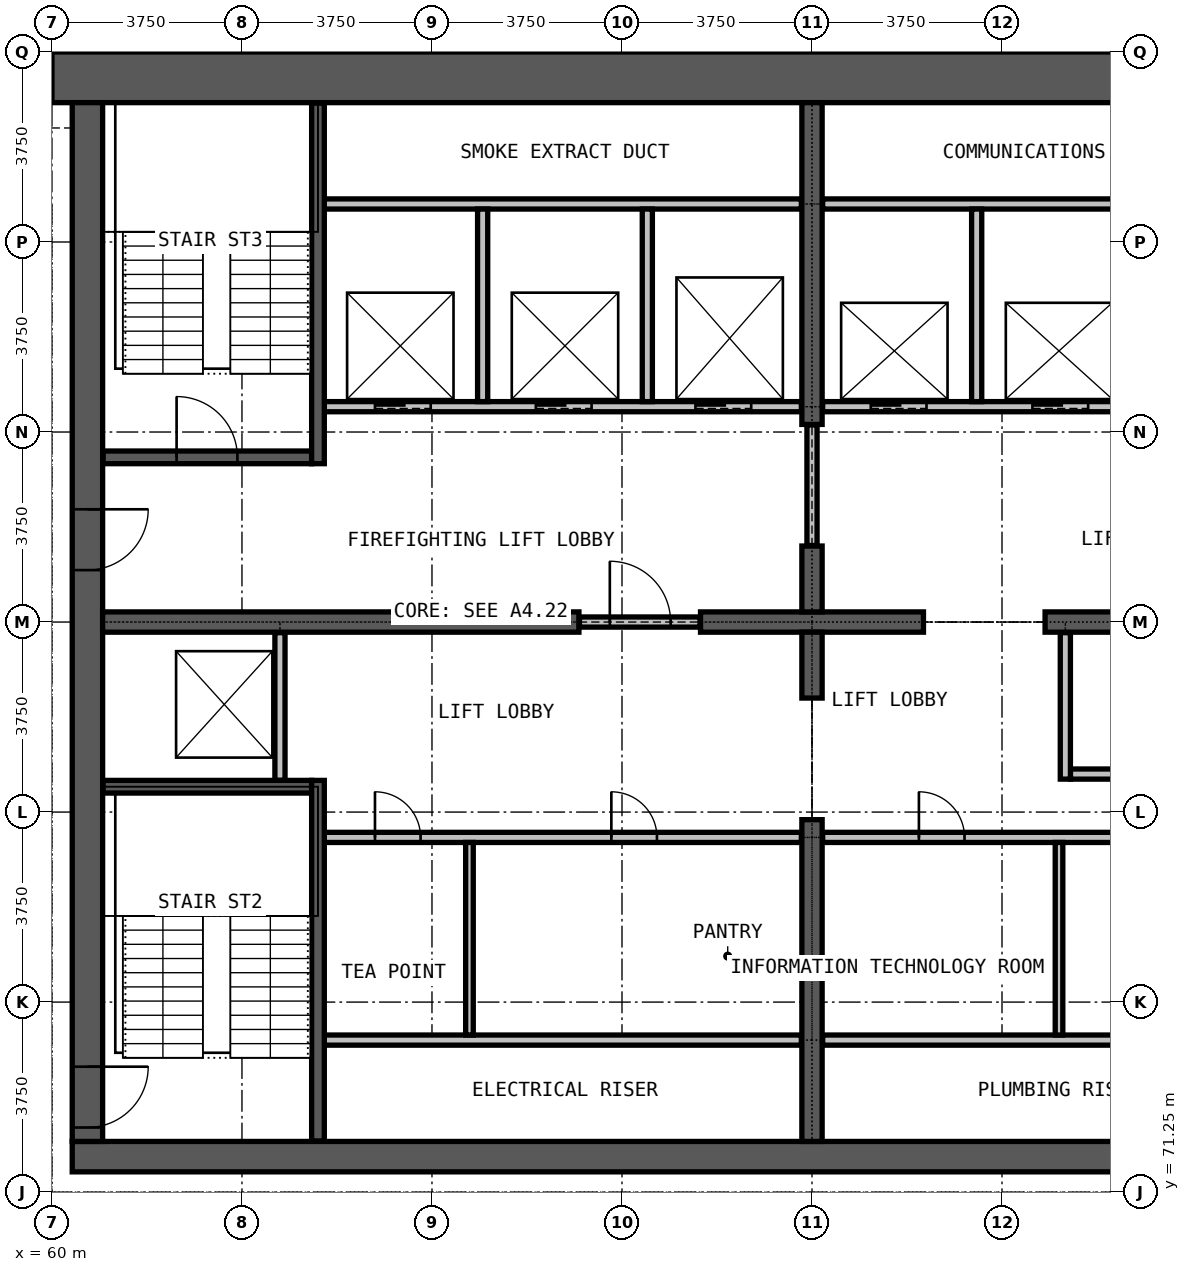
"""IFC4 building model, lengths in metres.
Left out: names, types, materials, properties, quantities, classifications, styles, units other than length and angle.
Written with IfcOpenShell. Run it as: python <this file> out.ifc"""

import sys

from ifc_helpers import new_model, si_unit, direction, frame, frame_2d, origin, place, context, subcontext, project, spatial, rectangle, extrude, element, fill, save


model = new_model("IFC4")
c1 = context("Model", 3, precision=1e-05, world=origin(), true_north=direction((0.0, 1.0)))
c2 = subcontext(c1, "Body", "Model", "MODEL_VIEW")
j1 = project(units=[si_unit("LENGTHUNIT", "METRE"), si_unit("PLANEANGLEUNIT", "RADIAN")], contexts=[c1])
p1 = place(None, origin())
s1 = spatial("IfcSite", under=j1, at=p1, CompositionType="ELEMENT")
p2 = place(p1, origin())
s2 = spatial("IfcBuilding", under=s1, at=p2, CompositionType="ELEMENT")
p3 = place(p2, frame((0.0, 0.0, 235.5)))
s3 = spatial("IfcBuildingStorey", under=s2, at=p3, CompositionType="ELEMENT", Elevation=235.5)
p4 = place(p3, frame((60.4, 71.95, 0.0), z_axis=(0.0, 0.0, 1.0), x_axis=(1.0, 0.0, 0.0)))
e1 = element("IfcWall", 1, at=p4, inside=s3, PredefinedType="SHEAR", context=c2, shape_type="SweptSolid", body=[
    extrude(rectangle(XDim=29.2, YDim=0.6, at=frame_2d((14.6, 0.0))), origin(), (0.0, 0.0, 1.0), 3.6),
])
p5 = place(p3, frame((90.0, 93.25, 0.0), z_axis=(0.0, 0.0, 1.0), x_axis=(-1.0, 0.0, 0.0)))
e2 = element("IfcWall", 2, at=p5, inside=s3, PredefinedType="SHEAR", context=c2, shape_type="SweptSolid", body=[
    extrude(rectangle(XDim=30.0, YDim=1.0, at=frame_2d((15.0, 0.0))), origin(), (0.0, 0.0, 1.0), 3.6),
])
p6 = place(p3, frame((60.7, 92.75, 0.0), z_axis=(0.0, 0.0, 1.0), x_axis=(0.0, -1.0, 0.0)))
e3 = element("IfcWall", 3, at=p6, inside=s3, PredefinedType="SHEAR", context=c2, shape_type="SweptSolid", body=[
    extrude(rectangle(XDim=20.5, YDim=0.6, at=frame_2d((10.25, 0.0))), origin(), (0.0, 0.0, 1.0), 3.6),
])
p7 = place(p6, frame((19.025, 0.0, 0.0)))
e4 = element("IfcOpeningElement", 4, at=p7, cuts=e3, PredefinedType="OPENING", context=c2, shape_type="SweptSolid", body=[
    extrude(rectangle(XDim=1.2, YDim=2.2, at=frame_2d((0.6, 1.1))), frame((0.0, 0.31, 0.0), z_axis=(0.0, -1.0, 0.0), x_axis=(1.0, 0.0, 0.0)), (0.0, 0.0, 1.0), 0.62),
])
p8 = place(p6, frame((8.025, 0.0, 0.0)))
e5 = element("IfcOpeningElement", 5, at=p8, cuts=e3, PredefinedType="OPENING", context=c2, shape_type="SweptSolid", body=[
    extrude(rectangle(XDim=1.2, YDim=2.2, at=frame_2d((0.6, 1.1))), frame((0.0, 0.31, 0.0), z_axis=(0.0, -1.0, 0.0), x_axis=(1.0, 0.0, 0.0)), (0.0, 0.0, 1.0), 0.62),
])
p9 = place(p3, frame((61.0, 82.5, 0.0), z_axis=(0.0, 0.0, 1.0), x_axis=(1.0, 0.0, 0.0)))
e6 = element("IfcWall", 6, at=p9, inside=s3, PredefinedType="SHEAR", context=c2, shape_type="SweptSolid", body=[
    extrude(rectangle(XDim=9.4, YDim=0.4, at=frame_2d((4.7, 0.0))), origin(), (0.0, 0.0, 1.0), 3.6),
])
p10 = place(p3, frame((72.8, 82.5, 0.0), z_axis=(0.0, 0.0, 1.0), x_axis=(1.0, 0.0, 0.0)))
e7 = element("IfcWall", 7, at=p10, inside=s3, PredefinedType="SHEAR", context=c2, shape_type="SweptSolid", body=[
    extrude(rectangle(XDim=4.4, YDim=0.4, at=frame_2d((2.2, 0.0))), origin(), (0.0, 0.0, 1.0), 3.6),
])
p11 = place(p3, frame((79.6, 82.5, 0.0), z_axis=(0.0, 0.0, 1.0), x_axis=(1.0, 0.0, 0.0)))
e8 = element("IfcWall", 8, at=p11, inside=s3, PredefinedType="SHEAR", context=c2, shape_type="SweptSolid", body=[
    extrude(rectangle(XDim=9.4, YDim=0.4, at=frame_2d((4.7, 0.0))), origin(), (0.0, 0.0, 1.0), 3.6),
])
p12 = place(p3, frame((75.0, 72.25, 0.0), z_axis=(0.0, 0.0, 1.0), x_axis=(0.0, 1.0, 0.0)))
e9 = element("IfcWall", 9, at=p12, inside=s3, PredefinedType="SHEAR", context=c2, shape_type="SweptSolid", body=[
    extrude(rectangle(XDim=6.35, YDim=0.4, at=frame_2d((3.175, 0.0))), origin(), (0.0, 0.0, 1.0), 3.6),
])
for number, where, z_axis, x_axis in (
    (10, (75.0, 81.0, 0.0), (0.0, 0.0, 1.0), (0.0, 1.0, 0.0)),
    (11, (75.0, 82.7, 0.0), (0.0, 0.0, 1.0), (0.0, 1.0, 0.0)),
):
    element("IfcWall", number, at=place(p3, frame(where, z_axis=z_axis, x_axis=x_axis)), inside=s3, PredefinedType="SHEAR", context=c2, shape_type="SweptSolid", body=[
        extrude(rectangle(XDim=1.3, YDim=0.4, at=frame_2d((0.65, 0.0))), origin(), (0.0, 0.0, 1.0), 3.6),
    ])
p13 = place(p3, frame((75.0, 86.4, 0.0), z_axis=(0.0, 0.0, 1.0), x_axis=(0.0, 1.0, 0.0)))
e12 = element("IfcWall", 12, at=p13, inside=s3, PredefinedType="SHEAR", context=c2, shape_type="SweptSolid", body=[
    extrude(rectangle(XDim=6.35, YDim=0.4, at=frame_2d((3.175, 0.0))), origin(), (0.0, 0.0, 1.0), 3.6),
])
for number, where, z_axis, x_axis in (
    (13, (65.375, 74.25, 0.0), (0.0, 0.0, 1.0), (1.0, 0.0, 0.0)),
    (14, (75.21, 74.25, 0.0), (0.0, 0.0, 1.0), (1.0, 0.0, 0.0)),
):
    element("IfcWall", number, at=place(p3, frame(where, z_axis=z_axis, x_axis=x_axis)), inside=s3, PredefinedType="PARTITIONING", context=c2, shape_type="SweptSolid", body=[
        extrude(rectangle(XDim=9.415, YDim=0.2, at=frame_2d((4.708, 0.0))), origin(), (0.0, 0.0, 1.0), 3.3),
    ])
p14 = place(p3, frame((65.375, 78.25, 0.0), z_axis=(0.0, 0.0, 1.0), x_axis=(1.0, 0.0, 0.0)))
e15 = element("IfcWall", 15, at=p14, inside=s3, PredefinedType="PARTITIONING", context=c2, shape_type="SweptSolid", body=[
    extrude(rectangle(XDim=9.415, YDim=0.2, at=frame_2d((4.708, 0.0))), origin(), (0.0, 0.0, 1.0), 3.3),
])
p15 = place(p14, frame((1.0, 0.0, 0.0)))
e16 = element("IfcOpeningElement", 16, at=p15, cuts=e15, PredefinedType="OPENING", context=c2, shape_type="SweptSolid", body=[
    extrude(rectangle(XDim=0.9, YDim=2.2, at=frame_2d((0.45, 1.1))), frame((0.0, 0.11, 0.0), z_axis=(0.0, -1.0, 0.0), x_axis=(1.0, 0.0, 0.0)), (0.0, 0.0, 1.0), 0.22),
])
p16 = place(p14, frame((5.665, 0.0, 0.0)))
e17 = element("IfcOpeningElement", 17, at=p16, cuts=e15, PredefinedType="OPENING", context=c2, shape_type="SweptSolid", body=[
    extrude(rectangle(XDim=0.9, YDim=2.2, at=frame_2d((0.45, 1.1))), frame((0.0, 0.11, 0.0), z_axis=(0.0, -1.0, 0.0), x_axis=(1.0, 0.0, 0.0)), (0.0, 0.0, 1.0), 0.22),
])
p17 = place(p3, frame((75.21, 78.25, 0.0), z_axis=(0.0, 0.0, 1.0), x_axis=(1.0, 0.0, 0.0)))
e18 = element("IfcWall", 18, at=p17, inside=s3, PredefinedType="PARTITIONING", context=c2, shape_type="SweptSolid", body=[
    extrude(rectangle(XDim=9.415, YDim=0.2, at=frame_2d((4.708, 0.0))), origin(), (0.0, 0.0, 1.0), 3.3),
])
p18 = place(p17, frame((1.9, 0.0, 0.0)))
e19 = element("IfcOpeningElement", 19, at=p18, cuts=e18, PredefinedType="OPENING", context=c2, shape_type="SweptSolid", body=[
    extrude(rectangle(XDim=0.9, YDim=2.2, at=frame_2d((0.45, 1.1))), frame((0.0, 0.11, 0.0), z_axis=(0.0, -1.0, 0.0), x_axis=(1.0, 0.0, 0.0)), (0.0, 0.0, 1.0), 0.22),
])
p19 = place(p17, frame((6.565, 0.0, 0.0)))
e20 = element("IfcOpeningElement", 20, at=p19, cuts=e18, PredefinedType="OPENING", context=c2, shape_type="SweptSolid", body=[
    extrude(rectangle(XDim=0.9, YDim=2.2, at=frame_2d((0.45, 1.1))), frame((0.0, 0.11, 0.0), z_axis=(0.0, -1.0, 0.0), x_axis=(1.0, 0.0, 0.0)), (0.0, 0.0, 1.0), 0.22),
])
p20 = place(p3, frame((80.1, 79.5, 0.0), z_axis=(0.0, 0.0, 1.0), x_axis=(1.0, 0.0, 0.0)))
e21 = element("IfcWall", 21, at=p20, inside=s3, PredefinedType="PARTITIONING", context=c2, shape_type="SweptSolid", body=[
    extrude(rectangle(XDim=5.3, YDim=0.2, at=frame_2d((2.65, 0.0))), origin(), (0.0, 0.0, 1.0), 3.3),
])
p21 = place(p20, frame((2.2, 0.0, 0.0)))
e22 = element("IfcOpeningElement", 22, at=p21, cuts=e21, PredefinedType="OPENING", context=c2, shape_type="SweptSolid", body=[
    extrude(rectangle(XDim=0.9, YDim=2.2, at=frame_2d((0.45, 1.1))), frame((0.0, 0.11, 0.0), z_axis=(0.0, -1.0, 0.0), x_axis=(1.0, 0.0, 0.0)), (0.0, 0.0, 1.0), 0.22),
])
p22 = place(p3, frame((70.41, 82.5, 0.0), z_axis=(0.0, 0.0, 1.0), x_axis=(1.0, 0.0, 0.0)))
e23 = element("IfcWall", 23, at=p22, inside=s3, PredefinedType="PARTITIONING", context=c2, shape_type="SweptSolid", body=[
    extrude(rectangle(XDim=2.38, YDim=0.2, at=frame_2d((1.19, 0.0))), origin(), (0.0, 0.0, 1.0), 2.4),
])
p23 = place(p22, frame((0.6, 0.0, 0.0)))
e24 = element("IfcOpeningElement", 24, at=p23, cuts=e23, PredefinedType="OPENING", context=c2, shape_type="SweptSolid", body=[
    extrude(rectangle(XDim=1.2, YDim=2.2, at=frame_2d((0.6, 1.1))), frame((0.0, 0.11, 0.0), z_axis=(0.0, -1.0, 0.0), x_axis=(1.0, 0.0, 0.0)), (0.0, 0.0, 1.0), 0.22),
])
p24 = place(p3, frame((75.0, 84.01, 0.0), z_axis=(0.0, 0.0, 1.0), x_axis=(0.0, 1.0, 0.0)))
e25 = element("IfcWall", 25, at=p24, inside=s3, PredefinedType="PARTITIONING", context=c2, shape_type="SweptSolid", body=[
    extrude(rectangle(XDim=2.38, YDim=0.2, at=frame_2d((1.19, 0.0))), origin(), (0.0, 0.0, 1.0), 2.4),
])
p25 = place(p3, frame((80.0, 79.4, 0.0), z_axis=(0.0, 0.0, 1.0), x_axis=(0.0, 1.0, 0.0)))
e26 = element("IfcWall", 26, at=p25, inside=s3, PredefinedType="PARTITIONING", context=c2, shape_type="SweptSolid", body=[
    extrude(rectangle(XDim=2.89, YDim=0.2, at=frame_2d((1.445, 0.0))), origin(), (0.0, 0.0, 1.0), 3.3),
])
for number, where, z_axis, x_axis in (
    (27, (68.24, 74.35, 0.0), (0.0, 0.0, 1.0), (0.0, 1.0, 0.0)),
    (28, (79.875, 74.35, 0.0), (0.0, 0.0, 1.0), (0.0, 1.0, 0.0)),
):
    element("IfcWall", number, at=place(p3, frame(where, z_axis=z_axis, x_axis=x_axis)), inside=s3, PredefinedType="PARTITIONING", context=c2, shape_type="SweptSolid", body=[
        extrude(rectangle(XDim=3.8, YDim=0.15, at=frame_2d((1.9, 0.0))), origin(), (0.0, 0.0, 1.0), 3.3),
    ])
p26 = place(p3, frame((65.375, 86.75, 0.0), z_axis=(0.0, 0.0, 1.0), x_axis=(1.0, 0.0, 0.0)))
e29 = element("IfcWall", 29, at=p26, inside=s3, PredefinedType="PARTITIONING", context=c2, shape_type="SweptSolid", body=[
    extrude(rectangle(XDim=9.415, YDim=0.2, at=frame_2d((4.708, 0.0))), origin(), (0.0, 0.0, 1.0), 3.3),
])
p27 = place(p26, frame((1.0, 0.0, 0.0)))
e30 = element("IfcOpeningElement", 30, at=p27, cuts=e29, PredefinedType="OPENING", context=c2, shape_type="SweptSolid", body=[
    extrude(rectangle(XDim=1.1, YDim=2.2, at=frame_2d((0.55, 1.1))), frame((0.0, 0.11, 0.0), z_axis=(0.0, -1.0, 0.0), x_axis=(1.0, 0.0, 0.0)), (0.0, 0.0, 1.0), 0.22),
])
p28 = place(p26, frame((4.175, 0.0, 0.0)))
e31 = element("IfcOpeningElement", 31, at=p28, cuts=e29, PredefinedType="OPENING", context=c2, shape_type="SweptSolid", body=[
    extrude(rectangle(XDim=1.1, YDim=2.2, at=frame_2d((0.55, 1.1))), frame((0.0, 0.11, 0.0), z_axis=(0.0, -1.0, 0.0), x_axis=(1.0, 0.0, 0.0)), (0.0, 0.0, 1.0), 0.22),
])
p29 = place(p26, frame((7.325, 0.0, 0.0)))
e32 = element("IfcOpeningElement", 32, at=p29, cuts=e29, PredefinedType="OPENING", context=c2, shape_type="SweptSolid", body=[
    extrude(rectangle(XDim=1.1, YDim=2.2, at=frame_2d((0.55, 1.1))), frame((0.0, 0.11, 0.0), z_axis=(0.0, -1.0, 0.0), x_axis=(1.0, 0.0, 0.0)), (0.0, 0.0, 1.0), 0.22),
])
p30 = place(p3, frame((75.21, 86.75, 0.0), z_axis=(0.0, 0.0, 1.0), x_axis=(1.0, 0.0, 0.0)))
e33 = element("IfcWall", 33, at=p30, inside=s3, PredefinedType="PARTITIONING", context=c2, shape_type="SweptSolid", body=[
    extrude(rectangle(XDim=9.415, YDim=0.2, at=frame_2d((4.708, 0.0))), origin(), (0.0, 0.0, 1.0), 3.3),
])
p31 = place(p30, frame((0.95, 0.0, 0.0)))
e34 = element("IfcOpeningElement", 34, at=p31, cuts=e33, PredefinedType="OPENING", context=c2, shape_type="SweptSolid", body=[
    extrude(rectangle(XDim=1.1, YDim=2.2, at=frame_2d((0.55, 1.1))), frame((0.0, 0.11, 0.0), z_axis=(0.0, -1.0, 0.0), x_axis=(1.0, 0.0, 0.0)), (0.0, 0.0, 1.0), 0.22),
])
p32 = place(p30, frame((4.14, 0.0, 0.0)))
e35 = element("IfcOpeningElement", 35, at=p32, cuts=e33, PredefinedType="OPENING", context=c2, shape_type="SweptSolid", body=[
    extrude(rectangle(XDim=1.1, YDim=2.2, at=frame_2d((0.55, 1.1))), frame((0.0, 0.11, 0.0), z_axis=(0.0, -1.0, 0.0), x_axis=(1.0, 0.0, 0.0)), (0.0, 0.0, 1.0), 0.22),
])
p33 = place(p30, frame((7.29, 0.0, 0.0)))
e36 = element("IfcOpeningElement", 36, at=p33, cuts=e33, PredefinedType="OPENING", context=c2, shape_type="SweptSolid", body=[
    extrude(rectangle(XDim=1.1, YDim=2.2, at=frame_2d((0.55, 1.1))), frame((0.0, 0.11, 0.0), z_axis=(0.0, -1.0, 0.0), x_axis=(1.0, 0.0, 0.0)), (0.0, 0.0, 1.0), 0.22),
])
for number, where, z_axis, x_axis in (
    (37, (65.375, 90.75, 0.0), (0.0, 0.0, 1.0), (1.0, 0.0, 0.0)),
    (38, (75.21, 90.75, 0.0), (0.0, 0.0, 1.0), (1.0, 0.0, 0.0)),
):
    element("IfcWall", number, at=place(p3, frame(where, z_axis=z_axis, x_axis=x_axis)), inside=s3, PredefinedType="PARTITIONING", context=c2, shape_type="SweptSolid", body=[
        extrude(rectangle(XDim=9.415, YDim=0.2, at=frame_2d((4.708, 0.0))), origin(), (0.0, 0.0, 1.0), 3.3),
    ])
p34 = place(p3, frame((64.5, 79.375, 0.0), z_axis=(0.0, 0.0, 1.0), x_axis=(0.0, 1.0, 0.0)))
e39 = element("IfcWall", 39, at=p34, inside=s3, PredefinedType="PARTITIONING", context=c2, shape_type="SweptSolid", body=[
    extrude(rectangle(XDim=2.915, YDim=0.2, at=frame_2d((1.458, 0.0))), origin(), (0.0, 0.0, 1.0), 3.3),
])
for number, where, z_axis, x_axis in (
    (40, (68.5, 86.85, 0.0), (0.0, 0.0, 1.0), (0.0, 1.0, 0.0)),
    (41, (71.75, 86.85, 0.0), (0.0, 0.0, 1.0), (0.0, 1.0, 0.0)),
    (42, (78.25, 86.85, 0.0), (0.0, 0.0, 1.0), (0.0, 1.0, 0.0)),
):
    element("IfcWall", number, at=place(p3, frame(where, z_axis=z_axis, x_axis=x_axis)), inside=s3, PredefinedType="PARTITIONING", context=c2, shape_type="SweptSolid", body=[
        extrude(rectangle(XDim=3.8, YDim=0.2, at=frame_2d((1.9, 0.0))), origin(), (0.0, 0.0, 1.0), 3.3),
    ])
p35 = place(p3, frame((61.01, 79.25, 0.0), z_axis=(0.0, 0.0, 1.0), x_axis=(1.0, 0.0, 0.0)))
e43 = element("IfcWall", 43, at=p35, inside=s3, PredefinedType="PARTITIONING", context=c2, shape_type="SweptSolid", body=[
    extrude(rectangle(XDim=4.115, YDim=0.25, at=frame_2d((2.058, 0.0))), origin(), (0.0, 0.0, 1.0), 3.3),
])
p36 = place(p3, frame((61.01, 85.75, 0.0), z_axis=(0.0, 0.0, 1.0), x_axis=(1.0, 0.0, 0.0)))
e44 = element("IfcWall", 44, at=p36, inside=s3, PredefinedType="PARTITIONING", context=c2, shape_type="SweptSolid", body=[
    extrude(rectangle(XDim=4.115, YDim=0.25, at=frame_2d((2.058, 0.0))), origin(), (0.0, 0.0, 1.0), 3.3),
])
p37 = place(p36, frame((1.45, 0.0, 0.0)))
e45 = element("IfcOpeningElement", 45, at=p37, cuts=e44, PredefinedType="OPENING", context=c2, shape_type="SweptSolid", body=[
    extrude(rectangle(XDim=1.2, YDim=2.2, at=frame_2d((0.6, 1.1))), frame((0.0, 0.135, 0.0), z_axis=(0.0, -1.0, 0.0), x_axis=(1.0, 0.0, 0.0)), (0.0, 0.0, 1.0), 0.27),
])
for number, where, z_axis, x_axis in (
    (46, (65.25, 72.26, 0.0), (0.0, 0.0, 1.0), (0.0, 1.0, 0.0)),
    (47, (65.25, 85.625, 0.0), (0.0, 0.0, 1.0), (0.0, 1.0, 0.0)),
):
    element("IfcWall", number, at=place(p3, frame(where, z_axis=z_axis, x_axis=x_axis)), inside=s3, PredefinedType="PARTITIONING", context=c2, shape_type="SweptSolid", body=[
        extrude(rectangle(XDim=7.115, YDim=0.25, at=frame_2d((3.558, 0.0))), origin(), (0.0, 0.0, 1.0), 3.3),
    ])
p38 = place(p31, origin())
e48 = element("IfcDoor", 48, at=p38, inside=s3, OperationType="DOUBLE_DOOR_SLIDING", PredefinedType="DOOR", context=c2, shape_type="SweptSolid", body=[
    extrude(rectangle(XDim=1.1, YDim=2.2, at=frame_2d((0.55, 1.1))), frame((0.0, 0.025, 0.0), z_axis=(0.0, -1.0, 0.0), x_axis=(1.0, 0.0, 0.0)), (0.0, 0.0, 1.0), 0.05),
])
fill(e34, e48)
p39 = place(p32, origin())
e49 = element("IfcDoor", 49, at=p39, inside=s3, OperationType="DOUBLE_DOOR_SLIDING", PredefinedType="DOOR", context=c2, shape_type="SweptSolid", body=[
    extrude(rectangle(XDim=1.1, YDim=2.2, at=frame_2d((0.55, 1.1))), frame((0.0, 0.025, 0.0), z_axis=(0.0, -1.0, 0.0), x_axis=(1.0, 0.0, 0.0)), (0.0, 0.0, 1.0), 0.05),
])
fill(e35, e49)
p40 = place(p27, origin())
e50 = element("IfcDoor", 50, at=p40, inside=s3, OperationType="DOUBLE_DOOR_SLIDING", PredefinedType="DOOR", context=c2, shape_type="SweptSolid", body=[
    extrude(rectangle(XDim=1.1, YDim=2.2, at=frame_2d((0.55, 1.1))), frame((0.0, 0.025, 0.0), z_axis=(0.0, -1.0, 0.0), x_axis=(1.0, 0.0, 0.0)), (0.0, 0.0, 1.0), 0.05),
])
fill(e30, e50)
p41 = place(p28, origin())
e51 = element("IfcDoor", 51, at=p41, inside=s3, OperationType="DOUBLE_DOOR_SLIDING", PredefinedType="DOOR", context=c2, shape_type="SweptSolid", body=[
    extrude(rectangle(XDim=1.1, YDim=2.2, at=frame_2d((0.55, 1.1))), frame((0.0, 0.025, 0.0), z_axis=(0.0, -1.0, 0.0), x_axis=(1.0, 0.0, 0.0)), (0.0, 0.0, 1.0), 0.05),
])
fill(e31, e51)
p42 = place(p29, origin())
e52 = element("IfcDoor", 52, at=p42, inside=s3, OperationType="DOUBLE_DOOR_SLIDING", PredefinedType="DOOR", context=c2, shape_type="SweptSolid", body=[
    extrude(rectangle(XDim=1.1, YDim=2.2, at=frame_2d((0.55, 1.1))), frame((0.0, 0.025, 0.0), z_axis=(0.0, -1.0, 0.0), x_axis=(1.0, 0.0, 0.0)), (0.0, 0.0, 1.0), 0.05),
])
fill(e32, e52)
p43 = place(p23, origin())
e53 = element("IfcDoor", 53, at=p43, inside=s3, OperationType="SINGLE_SWING_RIGHT", PredefinedType="DOOR", context=c2, shape_type="SweptSolid", body=[
    extrude(rectangle(XDim=1.2, YDim=2.2, at=frame_2d((0.6, 1.1))), frame((0.0, 0.025, 0.0), z_axis=(0.0, -1.0, 0.0), x_axis=(1.0, 0.0, 0.0)), (0.0, 0.0, 1.0), 0.05),
])
fill(e24, e53)
p44 = place(p37, origin())
e54 = element("IfcDoor", 54, at=p44, inside=s3, OperationType="SINGLE_SWING_LEFT", PredefinedType="DOOR", context=c2, shape_type="SweptSolid", body=[
    extrude(rectangle(XDim=1.2, YDim=2.2, at=frame_2d((0.6, 1.1))), frame((0.0, 0.025, 0.0), z_axis=(0.0, -1.0, 0.0), x_axis=(1.0, 0.0, 0.0)), (0.0, 0.0, 1.0), 0.05),
])
fill(e45, e54)
p45 = place(p7, origin())
e55 = element("IfcDoor", 55, at=p45, inside=s3, OperationType="SINGLE_SWING_RIGHT", PredefinedType="DOOR", context=c2, shape_type="SweptSolid", body=[
    extrude(rectangle(XDim=1.2, YDim=2.2, at=frame_2d((0.6, 1.1))), frame((0.0, 0.025, 0.0), z_axis=(0.0, -1.0, 0.0), x_axis=(1.0, 0.0, 0.0)), (0.0, 0.0, 1.0), 0.05),
])
fill(e4, e55)
p46 = place(p8, origin())
e56 = element("IfcDoor", 56, at=p46, inside=s3, OperationType="SINGLE_SWING_LEFT", PredefinedType="DOOR", context=c2, shape_type="SweptSolid", body=[
    extrude(rectangle(XDim=1.2, YDim=2.2, at=frame_2d((0.6, 1.1))), frame((0.0, 0.025, 0.0), z_axis=(0.0, -1.0, 0.0), x_axis=(1.0, 0.0, 0.0)), (0.0, 0.0, 1.0), 0.05),
])
fill(e5, e56)
p47 = place(p15, origin())
e57 = element("IfcDoor", 57, at=p47, inside=s3, OperationType="SINGLE_SWING_LEFT", PredefinedType="DOOR", context=c2, shape_type="SweptSolid", body=[
    extrude(rectangle(XDim=0.9, YDim=2.2, at=frame_2d((0.45, 1.1))), frame((0.0, 0.025, 0.0), z_axis=(0.0, -1.0, 0.0), x_axis=(1.0, 0.0, 0.0)), (0.0, 0.0, 1.0), 0.05),
])
fill(e16, e57)
p48 = place(p16, origin())
e58 = element("IfcDoor", 58, at=p48, inside=s3, OperationType="SINGLE_SWING_LEFT", PredefinedType="DOOR", context=c2, shape_type="SweptSolid", body=[
    extrude(rectangle(XDim=0.9, YDim=2.2, at=frame_2d((0.45, 1.1))), frame((0.0, 0.025, 0.0), z_axis=(0.0, -1.0, 0.0), x_axis=(1.0, 0.0, 0.0)), (0.0, 0.0, 1.0), 0.05),
])
fill(e17, e58)
p49 = place(p18, origin())
e59 = element("IfcDoor", 59, at=p49, inside=s3, OperationType="SINGLE_SWING_RIGHT", PredefinedType="DOOR", context=c2, shape_type="SweptSolid", body=[
    extrude(rectangle(XDim=0.9, YDim=2.2, at=frame_2d((0.45, 1.1))), frame((0.0, 0.025, 0.0), z_axis=(0.0, -1.0, 0.0), x_axis=(1.0, 0.0, 0.0)), (0.0, 0.0, 1.0), 0.05),
])
fill(e19, e59)
save(model, sys.argv[1])
